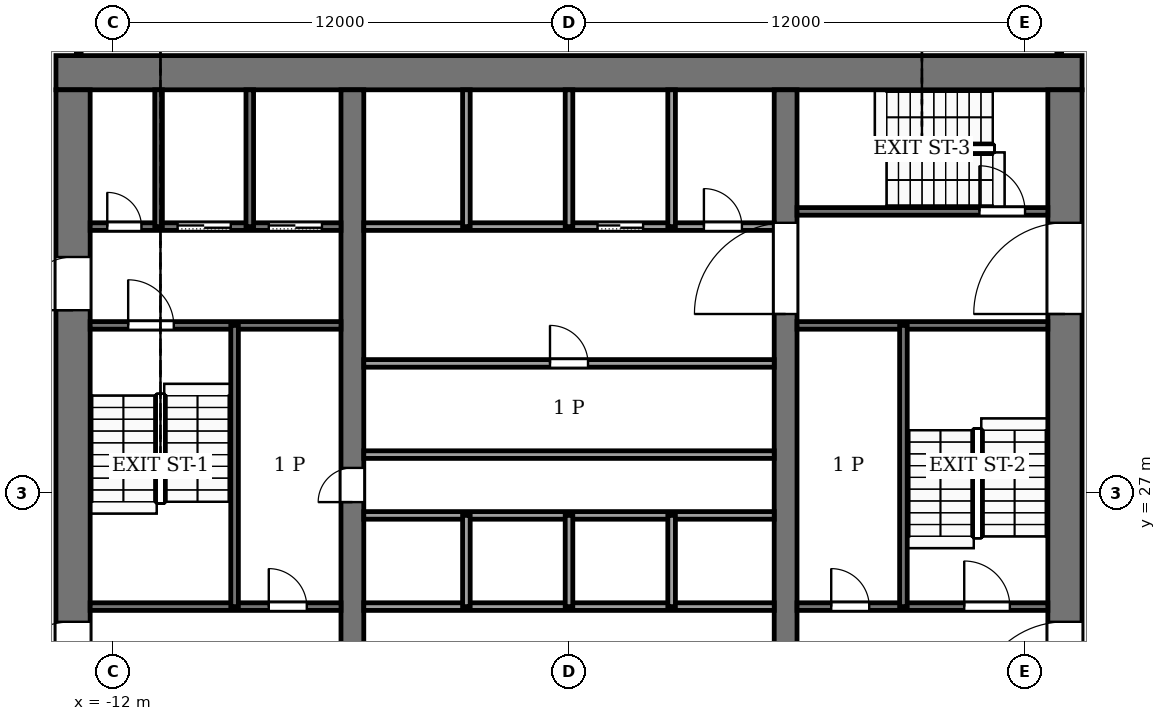
"""IFC4 building model, lengths in metres.
Left out: names, types, materials, properties, quantities, classifications, styles, units other than length and angle.
Written with IfcOpenShell. Run it as: python <this file> out.ifc"""

import sys

from ifc_helpers import new_model, si_unit, direction, frame, frame_2d, origin, place, context, subcontext, project, spatial, rectangle, extrude, element, fill, save


model = new_model("IFC4")
c1 = context("Model", 3, precision=1e-05, world=origin(), true_north=direction((0.0, 1.0)))
c2 = subcontext(c1, "Body", "Model", "MODEL_VIEW")
j1 = project(units=[si_unit("LENGTHUNIT", "METRE"), si_unit("PLANEANGLEUNIT", "RADIAN")], contexts=[c1])
p1 = place(None, origin())
s1 = spatial("IfcSite", under=j1, at=p1, CompositionType="ELEMENT")
p2 = place(p1, origin())
s2 = spatial("IfcBuilding", under=s1, at=p2, CompositionType="ELEMENT")
p3 = place(p2, frame((0.0, 0.0, 226.0)))
s3 = spatial("IfcBuildingStorey", under=s2, at=p3, CompositionType="ELEMENT", Elevation=226.0)
p4 = place(p3, frame((-13.5, 38.05, -0.25), z_axis=(0.0, 0.0, 1.0), x_axis=(1.0, 0.0, 0.0)))
e1 = element("IfcWall", 1, at=p4, inside=s3, PredefinedType="SHEAR", context=c2, shape_type="SweptSolid", body=[
    extrude(rectangle(XDim=27.0, YDim=0.9, at=frame_2d((13.5, 0.0))), origin(), (0.0, 0.0, 1.0), 7.12),
])
p5 = place(p3, frame((-13.05, 18.4, -0.25), z_axis=(0.0, 0.0, 1.0), x_axis=(0.0, 1.0, 0.0)))
e2 = element("IfcWall", 2, at=p5, inside=s3, PredefinedType="SHEAR", context=c2, shape_type="SweptSolid", body=[
    extrude(rectangle(XDim=19.2, YDim=0.9, at=frame_2d((9.6, 0.0))), origin(), (0.0, 0.0, 1.0), 7.12),
])
p6 = place(p5, frame((2.8, 0.0, 0.25)))
e3 = element("IfcOpeningElement", 3, at=p6, cuts=e2, PredefinedType="OPENING", context=c2, shape_type="SweptSolid", body=[
    extrude(rectangle(XDim=2.4, YDim=2.4, at=frame_2d((1.2, 1.2))), frame((0.0, 0.46, 0.0), z_axis=(0.0, -1.0, 0.0), x_axis=(1.0, 0.0, 0.0)), (0.0, 0.0, 1.0), 0.92),
])
p7 = place(p5, frame((13.4, 0.0, 0.25)))
e4 = element("IfcOpeningElement", 4, at=p7, cuts=e2, PredefinedType="OPENING", context=c2, shape_type="SweptSolid", body=[
    extrude(rectangle(XDim=1.4, YDim=2.2, at=frame_2d((0.7, 1.1))), frame((0.0, 0.46, 0.0), z_axis=(0.0, -1.0, 0.0), x_axis=(1.0, 0.0, 0.0)), (0.0, 0.0, 1.0), 0.92),
])
p8 = place(p3, frame((13.05, 18.4, -0.25), z_axis=(0.0, 0.0, 1.0), x_axis=(0.0, 1.0, 0.0)))
e5 = element("IfcWall", 5, at=p8, inside=s3, PredefinedType="SHEAR", context=c2, shape_type="SweptSolid", body=[
    extrude(rectangle(XDim=19.2, YDim=0.9, at=frame_2d((9.6, 0.0))), origin(), (0.0, 0.0, 1.0), 7.12),
])
p9 = place(p8, frame((2.8, 0.0, 0.25)))
e6 = element("IfcOpeningElement", 6, at=p9, cuts=e5, PredefinedType="OPENING", context=c2, shape_type="SweptSolid", body=[
    extrude(rectangle(XDim=2.4, YDim=2.4, at=frame_2d((1.2, 1.2))), frame((0.0, 0.46, 0.0), z_axis=(0.0, -1.0, 0.0), x_axis=(1.0, 0.0, 0.0)), (0.0, 0.0, 1.0), 0.92),
])
p10 = place(p8, frame((13.3, 0.0, 0.25)))
e7 = element("IfcOpeningElement", 7, at=p10, cuts=e5, PredefinedType="OPENING", context=c2, shape_type="SweptSolid", body=[
    extrude(rectangle(XDim=2.4, YDim=2.4, at=frame_2d((1.2, 1.2))), frame((0.0, 0.46, 0.0), z_axis=(0.0, -1.0, 0.0), x_axis=(1.0, 0.0, 0.0)), (0.0, 0.0, 1.0), 0.92),
])
p11 = place(p3, frame((-5.7, 18.4, -0.25), z_axis=(0.0, 0.0, 1.0), x_axis=(0.0, 1.0, 0.0)))
e8 = element("IfcWall", 8, at=p11, inside=s3, PredefinedType="SHEAR", context=c2, shape_type="SweptSolid", body=[
    extrude(rectangle(XDim=19.2, YDim=0.6, at=frame_2d((9.6, 0.0))), origin(), (0.0, 0.0, 1.0), 7.12),
])
p12 = place(p11, frame((8.35, 0.0, 0.25)))
e9 = element("IfcOpeningElement", 9, at=p12, cuts=e8, PredefinedType="OPENING", context=c2, shape_type="SweptSolid", body=[
    extrude(rectangle(XDim=0.9, YDim=2.1, at=frame_2d((0.45, 1.05))), frame((0.0, 0.31, 0.0), z_axis=(0.0, -1.0, 0.0), x_axis=(1.0, 0.0, 0.0)), (0.0, 0.0, 1.0), 0.62),
])
p13 = place(p3, frame((5.7, 18.4, -0.25), z_axis=(0.0, 0.0, 1.0), x_axis=(0.0, 1.0, 0.0)))
e10 = element("IfcWall", 10, at=p13, inside=s3, PredefinedType="SHEAR", context=c2, shape_type="SweptSolid", body=[
    extrude(rectangle(XDim=19.2, YDim=0.6, at=frame_2d((9.6, 0.0))), origin(), (0.0, 0.0, 1.0), 7.12),
])
p14 = place(p13, frame((13.3, 0.0, 0.25)))
e11 = element("IfcOpeningElement", 11, at=p14, cuts=e10, PredefinedType="OPENING", context=c2, shape_type="SweptSolid", body=[
    extrude(rectangle(XDim=2.4, YDim=2.4, at=frame_2d((1.2, 1.2))), frame((0.0, 0.31, 0.0), z_axis=(0.0, -1.0, 0.0), x_axis=(1.0, 0.0, 0.0)), (0.0, 0.0, 1.0), 0.62),
])
p15 = place(p3, frame((-12.6, 24.0, 0.0), z_axis=(0.0, 0.0, 1.0), x_axis=(1.0, 0.0, 0.0)))
e12 = element("IfcWall", 12, at=p15, inside=s3, PredefinedType="PARTITIONING", context=c2, shape_type="SweptSolid", body=[
    extrude(rectangle(XDim=6.6, YDim=0.2, at=frame_2d((3.3, 0.0))), origin(), (0.0, 0.0, 1.0), 6.87),
])
p16 = place(p15, frame((4.7, 0.0, 0.0)))
e13 = element("IfcOpeningElement", 13, at=p16, cuts=e12, PredefinedType="OPENING", context=c2, shape_type="SweptSolid", body=[
    extrude(rectangle(XDim=1.0, YDim=2.1, at=frame_2d((0.5, 1.05))), frame((0.0, 0.11, 0.0), z_axis=(0.0, -1.0, 0.0), x_axis=(1.0, 0.0, 0.0)), (0.0, 0.0, 1.0), 0.22),
])
p17 = place(p3, frame((-5.4, 24.0, 0.0), z_axis=(0.0, 0.0, 1.0), x_axis=(1.0, 0.0, 0.0)))
e14 = element("IfcWall", 14, at=p17, inside=s3, PredefinedType="PARTITIONING", context=c2, shape_type="SweptSolid", body=[
    extrude(rectangle(XDim=10.8, YDim=0.2, at=frame_2d((5.4, 0.0))), origin(), (0.0, 0.0, 1.0), 6.87),
])
p18 = place(p3, frame((6.0, 24.0, 0.0), z_axis=(0.0, 0.0, 1.0), x_axis=(1.0, 0.0, 0.0)))
e15 = element("IfcWall", 15, at=p18, inside=s3, PredefinedType="PARTITIONING", context=c2, shape_type="SweptSolid", body=[
    extrude(rectangle(XDim=6.6, YDim=0.2, at=frame_2d((3.3, 0.0))), origin(), (0.0, 0.0, 1.0), 6.87),
])
p19 = place(p18, frame((0.9, 0.0, 0.0)))
e16 = element("IfcOpeningElement", 16, at=p19, cuts=e15, PredefinedType="OPENING", context=c2, shape_type="SweptSolid", body=[
    extrude(rectangle(XDim=1.0, YDim=2.1, at=frame_2d((0.5, 1.05))), frame((0.0, 0.11, 0.0), z_axis=(0.0, -1.0, 0.0), x_axis=(1.0, 0.0, 0.0)), (0.0, 0.0, 1.0), 0.22),
])
p20 = place(p18, frame((4.4, 0.0, 0.0)))
e17 = element("IfcOpeningElement", 17, at=p20, cuts=e15, PredefinedType="OPENING", context=c2, shape_type="SweptSolid", body=[
    extrude(rectangle(XDim=1.2, YDim=2.2, at=frame_2d((0.6, 1.1))), frame((0.0, 0.11, 0.0), z_axis=(0.0, -1.0, 0.0), x_axis=(1.0, 0.0, 0.0)), (0.0, 0.0, 1.0), 0.22),
])
for number, where, z_axis, x_axis in (
    (18, (-5.4, 26.4, 0.0), (0.0, 0.0, 1.0), (1.0, 0.0, 0.0)),
    (19, (-5.4, 28.0, 0.0), (0.0, 0.0, 1.0), (1.0, 0.0, 0.0)),
):
    element("IfcWall", number, at=place(p3, frame(where, z_axis=z_axis, x_axis=x_axis)), inside=s3, PredefinedType="PARTITIONING", context=c2, shape_type="SweptSolid", body=[
        extrude(rectangle(XDim=10.8, YDim=0.2, at=frame_2d((5.4, 0.0))), origin(), (0.0, 0.0, 1.0), 6.87),
    ])
p21 = place(p3, frame((-5.4, 30.4, 0.0), z_axis=(0.0, 0.0, 1.0), x_axis=(1.0, 0.0, 0.0)))
e20 = element("IfcWall", 20, at=p21, inside=s3, PredefinedType="PARTITIONING", context=c2, shape_type="SweptSolid", body=[
    extrude(rectangle(XDim=10.8, YDim=0.2, at=frame_2d((5.4, 0.0))), origin(), (0.0, 0.0, 1.0), 6.87),
])
p22 = place(p21, frame((4.9, 0.0, 0.0)))
e21 = element("IfcOpeningElement", 21, at=p22, cuts=e20, PredefinedType="OPENING", context=c2, shape_type="SweptSolid", body=[
    extrude(rectangle(XDim=1.0, YDim=2.1, at=frame_2d((0.5, 1.05))), frame((0.0, 0.11, 0.0), z_axis=(0.0, -1.0, 0.0), x_axis=(1.0, 0.0, 0.0)), (0.0, 0.0, 1.0), 0.22),
])
p23 = place(p3, frame((-12.6, 31.4, 0.0), z_axis=(0.0, 0.0, 1.0), x_axis=(1.0, 0.0, 0.0)))
e22 = element("IfcWall", 22, at=p23, inside=s3, PredefinedType="PARTITIONING", context=c2, shape_type="SweptSolid", body=[
    extrude(rectangle(XDim=6.6, YDim=0.2, at=frame_2d((3.3, 0.0))), origin(), (0.0, 0.0, 1.0), 6.87),
])
p24 = place(p23, frame((1.0, 0.0, 0.0)))
e23 = element("IfcOpeningElement", 23, at=p24, cuts=e22, PredefinedType="OPENING", context=c2, shape_type="SweptSolid", body=[
    extrude(rectangle(XDim=1.2, YDim=2.2, at=frame_2d((0.6, 1.1))), frame((0.0, 0.11, 0.0), z_axis=(0.0, -1.0, 0.0), x_axis=(1.0, 0.0, 0.0)), (0.0, 0.0, 1.0), 0.22),
])
p25 = place(p3, frame((6.0, 31.4, 0.0), z_axis=(0.0, 0.0, 1.0), x_axis=(1.0, 0.0, 0.0)))
e24 = element("IfcWall", 24, at=p25, inside=s3, PredefinedType="PARTITIONING", context=c2, shape_type="SweptSolid", body=[
    extrude(rectangle(XDim=6.6, YDim=0.2, at=frame_2d((3.3, 0.0))), origin(), (0.0, 0.0, 1.0), 6.87),
])
p26 = place(p3, frame((-12.6, 34.0, 0.0), z_axis=(0.0, 0.0, 1.0), x_axis=(1.0, 0.0, 0.0)))
e25 = element("IfcWall", 25, at=p26, inside=s3, PredefinedType="PARTITIONING", context=c2, shape_type="SweptSolid", body=[
    extrude(rectangle(XDim=6.6, YDim=0.2, at=frame_2d((3.3, 0.0))), origin(), (0.0, 0.0, 1.0), 6.87),
])
p27 = place(p26, frame((4.7, 0.0, 0.0)))
e26 = element("IfcOpeningElement", 26, at=p27, cuts=e25, PredefinedType="OPENING", context=c2, shape_type="SweptSolid", body=[
    extrude(rectangle(XDim=1.4, YDim=2.2, at=frame_2d((0.7, 1.1))), frame((0.0, 0.11, 0.0), z_axis=(0.0, -1.0, 0.0), x_axis=(1.0, 0.0, 0.0)), (0.0, 0.0, 1.0), 0.22),
])
p28 = place(p26, frame((2.3, 0.0, 0.0)))
e27 = element("IfcOpeningElement", 27, at=p28, cuts=e25, PredefinedType="OPENING", context=c2, shape_type="SweptSolid", body=[
    extrude(rectangle(XDim=1.4, YDim=2.2, at=frame_2d((0.7, 1.1))), frame((0.0, 0.11, 0.0), z_axis=(0.0, -1.0, 0.0), x_axis=(1.0, 0.0, 0.0)), (0.0, 0.0, 1.0), 0.22),
])
p29 = place(p26, frame((0.45, 0.0, 0.0)))
e28 = element("IfcOpeningElement", 28, at=p29, cuts=e25, PredefinedType="OPENING", context=c2, shape_type="SweptSolid", body=[
    extrude(rectangle(XDim=0.9, YDim=2.1, at=frame_2d((0.45, 1.05))), frame((0.0, 0.11, 0.0), z_axis=(0.0, -1.0, 0.0), x_axis=(1.0, 0.0, 0.0)), (0.0, 0.0, 1.0), 0.22),
])
p30 = place(p3, frame((-5.4, 34.0, 0.0), z_axis=(0.0, 0.0, 1.0), x_axis=(1.0, 0.0, 0.0)))
e29 = element("IfcWall", 29, at=p30, inside=s3, PredefinedType="PARTITIONING", context=c2, shape_type="SweptSolid", body=[
    extrude(rectangle(XDim=10.8, YDim=0.2, at=frame_2d((5.4, 0.0))), origin(), (0.0, 0.0, 1.0), 6.87),
])
p31 = place(p30, frame((6.15, 0.0, 0.0)))
e30 = element("IfcOpeningElement", 30, at=p31, cuts=e29, PredefinedType="OPENING", context=c2, shape_type="SweptSolid", body=[
    extrude(rectangle(XDim=1.2, YDim=2.2, at=frame_2d((0.6, 1.1))), frame((0.0, 0.11, 0.0), z_axis=(0.0, -1.0, 0.0), x_axis=(1.0, 0.0, 0.0)), (0.0, 0.0, 1.0), 0.22),
])
p32 = place(p30, frame((8.95, 0.0, 0.0)))
e31 = element("IfcOpeningElement", 31, at=p32, cuts=e29, PredefinedType="OPENING", context=c2, shape_type="SweptSolid", body=[
    extrude(rectangle(XDim=1.0, YDim=2.1, at=frame_2d((0.5, 1.05))), frame((0.0, 0.11, 0.0), z_axis=(0.0, -1.0, 0.0), x_axis=(1.0, 0.0, 0.0)), (0.0, 0.0, 1.0), 0.22),
])
p33 = place(p3, frame((6.0, 34.4, 0.0), z_axis=(0.0, 0.0, 1.0), x_axis=(1.0, 0.0, 0.0)))
e32 = element("IfcWall", 32, at=p33, inside=s3, PredefinedType="PARTITIONING", context=c2, shape_type="SweptSolid", body=[
    extrude(rectangle(XDim=6.6, YDim=0.2, at=frame_2d((3.3, 0.0))), origin(), (0.0, 0.0, 1.0), 6.87),
])
p34 = place(p33, frame((4.8, 0.0, 0.0)))
e33 = element("IfcOpeningElement", 33, at=p34, cuts=e32, PredefinedType="OPENING", context=c2, shape_type="SweptSolid", body=[
    extrude(rectangle(XDim=1.2, YDim=2.2, at=frame_2d((0.6, 1.1))), frame((0.0, 0.11, 0.0), z_axis=(0.0, -1.0, 0.0), x_axis=(1.0, 0.0, 0.0)), (0.0, 0.0, 1.0), 0.22),
])
p35 = place(p3, frame((-10.8, 34.0, 0.0), z_axis=(0.0, 0.0, 1.0), x_axis=(0.0, 1.0, 0.0)))
e34 = element("IfcWall", 34, at=p35, inside=s3, PredefinedType="PARTITIONING", context=c2, shape_type="SweptSolid", body=[
    extrude(rectangle(XDim=3.6, YDim=0.2, at=frame_2d((1.8, 0.0))), origin(), (0.0, 0.0, 1.0), 6.87),
])
p36 = place(p3, frame((-8.8, 24.0, 0.0), z_axis=(0.0, 0.0, 1.0), x_axis=(0.0, 1.0, 0.0)))
e35 = element("IfcWall", 35, at=p36, inside=s3, PredefinedType="PARTITIONING", context=c2, shape_type="SweptSolid", body=[
    extrude(rectangle(XDim=7.4, YDim=0.2, at=frame_2d((3.7, 0.0))), origin(), (0.0, 0.0, 1.0), 6.87),
])
p37 = place(p3, frame((-8.4, 34.0, 0.0), z_axis=(0.0, 0.0, 1.0), x_axis=(0.0, 1.0, 0.0)))
e36 = element("IfcWall", 36, at=p37, inside=s3, PredefinedType="PARTITIONING", context=c2, shape_type="SweptSolid", body=[
    extrude(rectangle(XDim=3.6, YDim=0.2, at=frame_2d((1.8, 0.0))), origin(), (0.0, 0.0, 1.0), 6.87),
])
p38 = place(p3, frame((-2.7, 24.0, 0.0), z_axis=(0.0, 0.0, 1.0), x_axis=(0.0, 1.0, 0.0)))
e37 = element("IfcWall", 37, at=p38, inside=s3, PredefinedType="PARTITIONING", context=c2, shape_type="SweptSolid", body=[
    extrude(rectangle(XDim=2.4, YDim=0.2, at=frame_2d((1.2, 0.0))), origin(), (0.0, 0.0, 1.0), 6.87),
])
p39 = place(p3, frame((-2.7, 34.0, 0.0), z_axis=(0.0, 0.0, 1.0), x_axis=(0.0, 1.0, 0.0)))
e38 = element("IfcWall", 38, at=p39, inside=s3, PredefinedType="PARTITIONING", context=c2, shape_type="SweptSolid", body=[
    extrude(rectangle(XDim=3.6, YDim=0.2, at=frame_2d((1.8, 0.0))), origin(), (0.0, 0.0, 1.0), 6.87),
])
p40 = place(p3, frame((0.0, 24.0, 0.0), z_axis=(0.0, 0.0, 1.0), x_axis=(0.0, 1.0, 0.0)))
e39 = element("IfcWall", 39, at=p40, inside=s3, PredefinedType="PARTITIONING", context=c2, shape_type="SweptSolid", body=[
    extrude(rectangle(XDim=2.4, YDim=0.2, at=frame_2d((1.2, 0.0))), origin(), (0.0, 0.0, 1.0), 6.87),
])
p41 = place(p3, frame((0.0, 34.0, 0.0), z_axis=(0.0, 0.0, 1.0), x_axis=(0.0, 1.0, 0.0)))
e40 = element("IfcWall", 40, at=p41, inside=s3, PredefinedType="PARTITIONING", context=c2, shape_type="SweptSolid", body=[
    extrude(rectangle(XDim=3.6, YDim=0.2, at=frame_2d((1.8, 0.0))), origin(), (0.0, 0.0, 1.0), 6.87),
])
p42 = place(p3, frame((2.7, 24.0, 0.0), z_axis=(0.0, 0.0, 1.0), x_axis=(0.0, 1.0, 0.0)))
e41 = element("IfcWall", 41, at=p42, inside=s3, PredefinedType="PARTITIONING", context=c2, shape_type="SweptSolid", body=[
    extrude(rectangle(XDim=2.4, YDim=0.2, at=frame_2d((1.2, 0.0))), origin(), (0.0, 0.0, 1.0), 6.87),
])
p43 = place(p3, frame((2.7, 34.0, 0.0), z_axis=(0.0, 0.0, 1.0), x_axis=(0.0, 1.0, 0.0)))
e42 = element("IfcWall", 42, at=p43, inside=s3, PredefinedType="PARTITIONING", context=c2, shape_type="SweptSolid", body=[
    extrude(rectangle(XDim=3.6, YDim=0.2, at=frame_2d((1.8, 0.0))), origin(), (0.0, 0.0, 1.0), 6.87),
])
p44 = place(p3, frame((8.8, 24.0, 0.0), z_axis=(0.0, 0.0, 1.0), x_axis=(0.0, 1.0, 0.0)))
e43 = element("IfcWall", 43, at=p44, inside=s3, PredefinedType="PARTITIONING", context=c2, shape_type="SweptSolid", body=[
    extrude(rectangle(XDim=7.4, YDim=0.2, at=frame_2d((3.7, 0.0))), origin(), (0.0, 0.0, 1.0), 6.87),
])
for number, where, z_axis, x_axis in (
    (44, (12.9, 38.55, 0.0), (0.0, 0.0, 1.0), (0.0, 1.0, 0.0)),
    (45, (-12.9, 66.908, 0.0), (0.0, 0.0, 1.0), (0.0, -1.0, 0.0)),
):
    element("IfcWall", number, at=place(p3, frame(where, z_axis=z_axis, x_axis=x_axis)), inside=s3, PredefinedType="PARTITIONING", context=c2, shape_type="SweptSolid", body=[
        extrude(rectangle(XDim=28.358, YDim=0.125, at=frame_2d((14.179, 0.0))), origin(), (0.0, 0.0, 1.0), 6.24),
    ])
p45 = place(p31, origin())
e46 = element("IfcDoor", 46, at=p45, inside=s3, OperationType="SLIDING_TO_LEFT", PredefinedType="DOOR", context=c2, shape_type="SweptSolid", body=[
    extrude(rectangle(XDim=1.2, YDim=2.2, at=frame_2d((0.6, 1.1))), frame((0.0, 0.025, 0.0), z_axis=(0.0, -1.0, 0.0), x_axis=(1.0, 0.0, 0.0)), (0.0, 0.0, 1.0), 0.05),
])
fill(e30, e46)
p46 = place(p27, origin())
e47 = element("IfcDoor", 47, at=p46, inside=s3, OperationType="SLIDING_TO_LEFT", PredefinedType="DOOR", context=c2, shape_type="SweptSolid", body=[
    extrude(rectangle(XDim=1.4, YDim=2.2, at=frame_2d((0.7, 1.1))), frame((0.0, 0.025, 0.0), z_axis=(0.0, -1.0, 0.0), x_axis=(1.0, 0.0, 0.0)), (0.0, 0.0, 1.0), 0.05),
])
fill(e26, e47)
p47 = place(p28, origin())
e48 = element("IfcDoor", 48, at=p47, inside=s3, OperationType="SLIDING_TO_LEFT", PredefinedType="DOOR", context=c2, shape_type="SweptSolid", body=[
    extrude(rectangle(XDim=1.4, YDim=2.2, at=frame_2d((0.7, 1.1))), frame((0.0, 0.025, 0.0), z_axis=(0.0, -1.0, 0.0), x_axis=(1.0, 0.0, 0.0)), (0.0, 0.0, 1.0), 0.05),
])
fill(e27, e48)
p48 = place(p29, origin())
e49 = element("IfcDoor", 49, at=p48, inside=s3, OperationType="SINGLE_SWING_RIGHT", PredefinedType="DOOR", context=c2, shape_type="SweptSolid", body=[
    extrude(rectangle(XDim=0.9, YDim=2.1, at=frame_2d((0.45, 1.05))), frame((0.0, 0.025, 0.0), z_axis=(0.0, -1.0, 0.0), x_axis=(1.0, 0.0, 0.0)), (0.0, 0.0, 1.0), 0.05),
])
fill(e28, e49)
p49 = place(p22, origin())
e50 = element("IfcDoor", 50, at=p49, inside=s3, OperationType="SINGLE_SWING_RIGHT", PredefinedType="DOOR", context=c2, shape_type="SweptSolid", body=[
    extrude(rectangle(XDim=1.0, YDim=2.1, at=frame_2d((0.5, 1.05))), frame((0.0, 0.025, 0.0), z_axis=(0.0, -1.0, 0.0), x_axis=(1.0, 0.0, 0.0)), (0.0, 0.0, 1.0), 0.05),
])
fill(e21, e50)
p50 = place(p16, origin())
e51 = element("IfcDoor", 51, at=p50, inside=s3, OperationType="SINGLE_SWING_LEFT", PredefinedType="DOOR", context=c2, shape_type="SweptSolid", body=[
    extrude(rectangle(XDim=1.0, YDim=2.1, at=frame_2d((0.5, 1.05))), frame((0.0, 0.025, 0.0), z_axis=(0.0, -1.0, 0.0), x_axis=(1.0, 0.0, 0.0)), (0.0, 0.0, 1.0), 0.05),
])
fill(e13, e51)
p51 = place(p19, origin())
e52 = element("IfcDoor", 52, at=p51, inside=s3, OperationType="SINGLE_SWING_RIGHT", PredefinedType="DOOR", context=c2, shape_type="SweptSolid", body=[
    extrude(rectangle(XDim=1.0, YDim=2.1, at=frame_2d((0.5, 1.05))), frame((0.0, 0.025, 0.0), z_axis=(0.0, -1.0, 0.0), x_axis=(1.0, 0.0, 0.0)), (0.0, 0.0, 1.0), 0.05),
])
fill(e16, e52)
p52 = place(p32, origin())
e53 = element("IfcDoor", 53, at=p52, inside=s3, OperationType="SINGLE_SWING_LEFT", PredefinedType="DOOR", context=c2, shape_type="SweptSolid", body=[
    extrude(rectangle(XDim=1.0, YDim=2.1, at=frame_2d((0.5, 1.05))), frame((0.0, 0.025, 0.0), z_axis=(0.0, -1.0, 0.0), x_axis=(1.0, 0.0, 0.0)), (0.0, 0.0, 1.0), 0.05),
])
fill(e31, e53)
p53 = place(p12, origin())
e54 = element("IfcDoor", 54, at=p53, inside=s3, OperationType="SINGLE_SWING_LEFT", PredefinedType="DOOR", context=c2, shape_type="SweptSolid", body=[
    extrude(rectangle(XDim=0.9, YDim=2.1, at=frame_2d((0.45, 1.05))), frame((0.0, 0.025, 0.0), z_axis=(0.0, -1.0, 0.0), x_axis=(1.0, 0.0, 0.0)), (0.0, 0.0, 1.0), 0.05),
])
fill(e9, e54)
p54 = place(p24, origin())
e55 = element("IfcDoor", 55, at=p54, inside=s3, OperationType="SINGLE_SWING_LEFT", PredefinedType="DOOR", context=c2, shape_type="SweptSolid", body=[
    extrude(rectangle(XDim=1.2, YDim=2.2, at=frame_2d((0.6, 1.1))), frame((0.0, 0.025, 0.0), z_axis=(0.0, -1.0, 0.0), x_axis=(1.0, 0.0, 0.0)), (0.0, 0.0, 1.0), 0.05),
])
fill(e23, e55)
p55 = place(p20, origin())
e56 = element("IfcDoor", 56, at=p55, inside=s3, OperationType="SINGLE_SWING_RIGHT", PredefinedType="DOOR", context=c2, shape_type="SweptSolid", body=[
    extrude(rectangle(XDim=1.2, YDim=2.2, at=frame_2d((0.6, 1.1))), frame((0.0, 0.025, 0.0), z_axis=(0.0, -1.0, 0.0), x_axis=(1.0, 0.0, 0.0)), (0.0, 0.0, 1.0), 0.05),
])
fill(e17, e56)
p56 = place(p34, origin())
e57 = element("IfcDoor", 57, at=p56, inside=s3, OperationType="SINGLE_SWING_LEFT", PredefinedType="DOOR", context=c2, shape_type="SweptSolid", body=[
    extrude(rectangle(XDim=1.2, YDim=2.2, at=frame_2d((0.6, 1.1))), frame((0.0, 0.025, 0.0), z_axis=(0.0, -1.0, 0.0), x_axis=(1.0, 0.0, 0.0)), (0.0, 0.0, 1.0), 0.05),
])
fill(e33, e57)
p57 = place(p14, origin())
e58 = element("IfcDoor", 58, at=p57, inside=s3, OperationType="DOUBLE_DOOR_SINGLE_SWING", PredefinedType="DOOR", context=c2, shape_type="SweptSolid", body=[
    extrude(rectangle(XDim=2.4, YDim=2.4, at=frame_2d((1.2, 1.2))), frame((0.0, 0.025, 0.0), z_axis=(0.0, -1.0, 0.0), x_axis=(1.0, 0.0, 0.0)), (0.0, 0.0, 1.0), 0.05),
])
fill(e11, e58)
p58 = place(p6, origin())
e59 = element("IfcDoor", 59, at=p58, inside=s3, OperationType="DOUBLE_DOOR_SINGLE_SWING", PredefinedType="DOOR", context=c2, shape_type="SweptSolid", body=[
    extrude(rectangle(XDim=2.4, YDim=2.4, at=frame_2d((1.2, 1.2))), frame((0.0, 0.025, 0.0), z_axis=(0.0, -1.0, 0.0), x_axis=(1.0, 0.0, 0.0)), (0.0, 0.0, 1.0), 0.05),
])
fill(e3, e59)
p59 = place(p9, origin())
e60 = element("IfcDoor", 60, at=p59, inside=s3, OperationType="DOUBLE_DOOR_SINGLE_SWING", PredefinedType="DOOR", context=c2, shape_type="SweptSolid", body=[
    extrude(rectangle(XDim=2.4, YDim=2.4, at=frame_2d((1.2, 1.2))), frame((0.0, 0.025, 0.0), z_axis=(0.0, -1.0, 0.0), x_axis=(1.0, 0.0, 0.0)), (0.0, 0.0, 1.0), 0.05),
])
fill(e6, e60)
p60 = place(p10, origin())
e61 = element("IfcDoor", 61, at=p60, inside=s3, OperationType="DOUBLE_DOOR_SINGLE_SWING", PredefinedType="DOOR", context=c2, shape_type="SweptSolid", body=[
    extrude(rectangle(XDim=2.4, YDim=2.4, at=frame_2d((1.2, 1.2))), frame((0.0, 0.025, 0.0), z_axis=(0.0, -1.0, 0.0), x_axis=(1.0, 0.0, 0.0)), (0.0, 0.0, 1.0), 0.05),
])
fill(e7, e61)
p61 = place(p7, origin())
e62 = element("IfcDoor", 62, at=p61, inside=s3, OperationType="SINGLE_SWING_LEFT", PredefinedType="DOOR", context=c2, shape_type="SweptSolid", body=[
    extrude(rectangle(XDim=1.4, YDim=2.2, at=frame_2d((0.7, 1.1))), frame((0.0, 0.025, 0.0), z_axis=(0.0, -1.0, 0.0), x_axis=(1.0, 0.0, 0.0)), (0.0, 0.0, 1.0), 0.05),
])
fill(e4, e62)
save(model, sys.argv[1])
